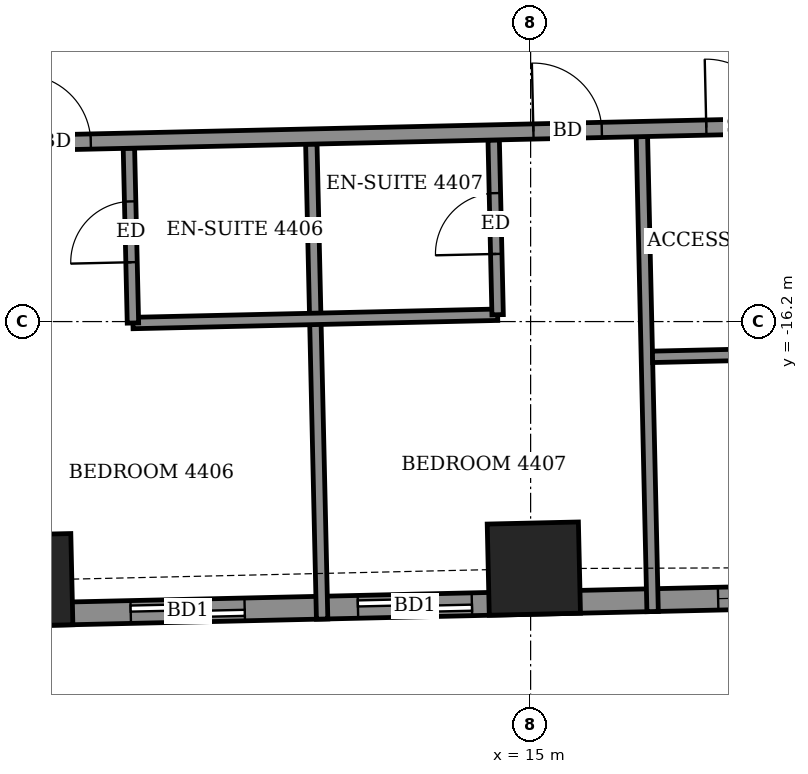
"""IFC4 building model, lengths in metres.
Left out: names, types, materials, properties, quantities, classifications, styles, units other than length and angle.
Written with IfcOpenShell. Run it as: python <this file> out.ifc"""

import sys

from ifc_helpers import new_model, si_unit, direction, frame, frame_2d, origin, origin_2d, place, context, subcontext, project, spatial, rectangle, extrude, element, fill, save


model = new_model("IFC4")
c1 = context("Model", 3, precision=1e-05, world=origin(), true_north=direction((0.0, 1.0)))
c2 = subcontext(c1, "Body", "Model", "MODEL_VIEW")
j1 = project(units=[si_unit("LENGTHUNIT", "METRE"), si_unit("PLANEANGLEUNIT", "RADIAN")], contexts=[c1])
p1 = place(None, origin())
s1 = spatial("IfcSite", under=j1, at=p1, CompositionType="ELEMENT")
p2 = place(p1, origin())
s2 = spatial("IfcBuilding", under=s1, at=p2, CompositionType="ELEMENT")
p3 = place(p2, frame((0.0, 0.0, 175.3)))
s3 = spatial("IfcBuildingStorey", under=s2, at=p3, CompositionType="ELEMENT", Elevation=175.3)
for number, where, z_axis, x_axis in (
    (1, (8.365, -19.602, -0.55), (0.0, 0.0, 1.0), (1.0, 0.023, 0.0)),
    (2, (15.042, -19.45, -0.55), (0.0, 0.0, 1.0), (1.0, 0.023, 0.0)),
):
    element("IfcColumn", number, at=place(p3, frame(where, z_axis=z_axis, x_axis=x_axis)), inside=s3, PredefinedType="COLUMN", context=c2, shape_type="SweptSolid", body=[
        extrude(rectangle(XDim=1.2, YDim=1.2, at=origin_2d()), origin(), (0.0, 0.0, 1.0), 3.6),
    ])
p4 = place(p3, frame((-18.189, -20.655, 0.0), z_axis=(0.0, 0.0, 1.0), x_axis=(0.999742285265, 0.022701609063, 0.0)))
e3 = element("IfcWall", 3, at=p4, inside=s3, PredefinedType="SOLIDWALL", context=c2, shape_type="SweptSolid", body=[
    extrude(rectangle(XDim=39.78, YDim=0.3, at=frame_2d((19.89, 0.0))), origin(), (0.0, 0.0, 1.0), 3.05),
])
p5 = place(p4, frame((1.973, 0.0, 0.0)))
e4 = element("IfcOpeningElement", 4, at=p5, cuts=e3, PredefinedType="OPENING", context=c2, shape_type="SweptSolid", body=[
    extrude(rectangle(XDim=1.5, YDim=2.4, at=frame_2d((0.75, 1.2))), frame((0.0, 0.16, 0.0), z_axis=(0.0, -1.0, 0.0), x_axis=(1.0, 0.0, 0.0)), (0.0, 0.0, 1.0), 0.32),
])
p6 = place(p4, frame((7.24, 0.0, 0.0)))
e5 = element("IfcOpeningElement", 5, at=p6, cuts=e3, PredefinedType="OPENING", context=c2, shape_type="SweptSolid", body=[
    extrude(rectangle(XDim=1.5, YDim=2.4, at=frame_2d((0.75, 1.2))), frame((0.0, 0.16, 0.0), z_axis=(0.0, -1.0, 0.0), x_axis=(1.0, 0.0, 0.0)), (0.0, 0.0, 1.0), 0.32),
])
p7 = place(p4, frame((10.23, 0.0, 0.0)))
e6 = element("IfcOpeningElement", 6, at=p7, cuts=e3, PredefinedType="OPENING", context=c2, shape_type="SweptSolid", body=[
    extrude(rectangle(XDim=1.5, YDim=2.4, at=frame_2d((0.75, 1.2))), frame((0.0, 0.16, 0.0), z_axis=(0.0, -1.0, 0.0), x_axis=(1.0, 0.0, 0.0)), (0.0, 0.0, 1.0), 0.32),
])
p8 = place(p4, frame((14.83, 0.0, 0.0)))
e7 = element("IfcOpeningElement", 7, at=p8, cuts=e3, PredefinedType="OPENING", context=c2, shape_type="SweptSolid", body=[
    extrude(rectangle(XDim=1.5, YDim=2.4, at=frame_2d((0.75, 1.2))), frame((0.0, 0.16, 0.0), z_axis=(0.0, -1.0, 0.0), x_axis=(1.0, 0.0, 0.0)), (0.0, 0.0, 1.0), 0.32),
])
p9 = place(p4, frame((17.97, 0.0, 0.0)))
e8 = element("IfcOpeningElement", 8, at=p9, cuts=e3, PredefinedType="OPENING", context=c2, shape_type="SweptSolid", body=[
    extrude(rectangle(XDim=1.2, YDim=2.4, at=frame_2d((0.6, 1.2))), frame((0.0, 0.16, 0.0), z_axis=(0.0, -1.0, 0.0), x_axis=(1.0, 0.0, 0.0)), (0.0, 0.0, 1.0), 0.32),
])
p10 = place(p4, frame((23.275, 0.0, 0.0)))
e9 = element("IfcOpeningElement", 9, at=p10, cuts=e3, PredefinedType="OPENING", context=c2, shape_type="SweptSolid", body=[
    extrude(rectangle(XDim=1.5, YDim=2.4, at=frame_2d((0.75, 1.2))), frame((0.0, 0.16, 0.0), z_axis=(0.0, -1.0, 0.0), x_axis=(1.0, 0.0, 0.0)), (0.0, 0.0, 1.0), 0.32),
])
p11 = place(p4, frame((27.935, 0.0, 0.0)))
e10 = element("IfcOpeningElement", 10, at=p11, cuts=e3, PredefinedType="OPENING", context=c2, shape_type="SweptSolid", body=[
    extrude(rectangle(XDim=1.5, YDim=2.4, at=frame_2d((0.75, 1.2))), frame((0.0, 0.16, 0.0), z_axis=(0.0, -1.0, 0.0), x_axis=(1.0, 0.0, 0.0)), (0.0, 0.0, 1.0), 0.32),
])
p12 = place(p4, frame((30.925, 0.0, 0.0)))
e11 = element("IfcOpeningElement", 11, at=p12, cuts=e3, PredefinedType="OPENING", context=c2, shape_type="SweptSolid", body=[
    extrude(rectangle(XDim=1.5, YDim=2.4, at=frame_2d((0.75, 1.2))), frame((0.0, 0.16, 0.0), z_axis=(0.0, -1.0, 0.0), x_axis=(1.0, 0.0, 0.0)), (0.0, 0.0, 1.0), 0.32),
])
p13 = place(p4, frame((35.665, 0.0, 0.9)))
e12 = element("IfcOpeningElement", 12, at=p13, cuts=e3, PredefinedType="OPENING", context=c2, shape_type="SweptSolid", body=[
    extrude(rectangle(XDim=2.4, YDim=1.5, at=frame_2d((1.2, 0.75))), frame((0.0, 0.16, 0.0), z_axis=(0.0, -1.0, 0.0), x_axis=(1.0, 0.0, 0.0)), (0.0, 0.0, 1.0), 0.32),
])
p14 = place(p3, frame((12.257, -20.114, 0.0), z_axis=(0.0, 0.0, 1.0), x_axis=(-0.022732052173, 0.999741593515, 0.0)))
e13 = element("IfcWall", 13, at=p14, inside=s3, PredefinedType="PARTITIONING", context=c2, shape_type="SweptSolid", body=[
    extrude(rectangle(XDim=6.251, YDim=0.15, at=frame_2d((3.125, 0.0))), origin(), (0.0, 0.0, 1.0), 2.55),
])
p15 = place(p3, frame((16.605, -20.015, 0.0), z_axis=(0.0, 0.0, 1.0), x_axis=(-0.022541260291, 0.999745913512, 0.0)))
e14 = element("IfcWall", 14, at=p15, inside=s3, PredefinedType="PARTITIONING", context=c2, shape_type="SweptSolid", body=[
    extrude(rectangle(XDim=6.25, YDim=0.15, at=frame_2d((3.125, 0.0))), origin(), (0.0, 0.0, 1.0), 2.55),
])
p16 = place(p3, frame((16.604, -16.664, 0.0), z_axis=(0.0, 0.0, 1.0), x_axis=(0.999744126128, 0.022620395041, 0.0)))
e15 = element("IfcWall", 15, at=p16, inside=s3, PredefinedType="PARTITIONING", context=c2, shape_type="SweptSolid", body=[
    extrude(rectangle(XDim=2.526, YDim=0.15, at=frame_2d((1.263, 0.0))), origin(), (0.0, 0.0, 1.0), 3.05),
])
p17 = place(p3, frame((9.768, -16.219, 0.0), z_axis=(0.0, 0.0, 1.0), x_axis=(0.999742570398, 0.022689048768, 0.0)))
e16 = element("IfcWall", 16, at=p17, inside=s3, PredefinedType="PARTITIONING", context=c2, shape_type="SweptSolid", body=[
    extrude(rectangle(XDim=4.799, YDim=0.15, at=frame_2d((2.399, 0.0))), origin(), (0.0, 0.0, 1.0), 3.05),
])
p18 = place(p3, frame((9.768, -16.219, 0.0), z_axis=(0.0, 0.0, 1.0), x_axis=(-0.023037316498, 0.999734605807, 0.0)))
e17 = element("IfcWall", 17, at=p18, inside=s3, PredefinedType="PARTITIONING", context=c2, shape_type="SweptSolid", body=[
    extrude(rectangle(XDim=2.3, YDim=0.15, at=frame_2d((1.15, 0.0))), origin(), (0.0, 0.0, 1.0), 3.05),
])
p19 = place(p18, frame((0.8, 0.0, 0.0)))
e18 = element("IfcOpeningElement", 18, at=p19, cuts=e17, PredefinedType="OPENING", context=c2, shape_type="SweptSolid", body=[
    extrude(rectangle(XDim=0.8, YDim=2.1, at=frame_2d((0.4, 1.05))), frame((0.0, 0.085, 0.0), z_axis=(0.0, -1.0, 0.0), x_axis=(1.0, 0.0, 0.0)), (0.0, 0.0, 1.0), 0.17),
])
p20 = place(p3, frame((14.566, -16.11, 0.0), z_axis=(0.0, 0.0, 1.0), x_axis=(-0.022612884682, 0.999744296031, 0.0)))
e19 = element("IfcWall", 19, at=p20, inside=s3, PredefinedType="PARTITIONING", context=c2, shape_type="SweptSolid", body=[
    extrude(rectangle(XDim=2.3, YDim=0.15, at=frame_2d((1.15, 0.0))), origin(), (0.0, 0.0, 1.0), 3.05),
])
p21 = place(p20, frame((0.8, 0.0, 0.0)))
e20 = element("IfcOpeningElement", 20, at=p21, cuts=e19, PredefinedType="OPENING", context=c2, shape_type="SweptSolid", body=[
    extrude(rectangle(XDim=0.8, YDim=2.1, at=frame_2d((0.4, 1.05))), frame((0.0, 0.085, 0.0), z_axis=(0.0, -1.0, 0.0), x_axis=(1.0, 0.0, 0.0)), (0.0, 0.0, 1.0), 0.17),
])
p22 = place(p3, frame((-21.279, -14.523, 0.0), z_axis=(0.0, 0.0, 1.0), x_axis=(0.999742878501, 0.022675468818, 0.0)))
e21 = element("IfcWall", 21, at=p22, inside=s3, PredefinedType="PARTITIONING", context=c2, shape_type="SweptSolid", body=[
    extrude(rectangle(XDim=46.48, YDim=0.2, at=frame_2d((23.24, 0.0))), origin(), (0.0, 0.0, 1.0), 3.05),
])
p23 = place(p22, frame((1.325, 0.0, 0.0)))
e22 = element("IfcOpeningElement", 22, at=p23, cuts=e21, PredefinedType="OPENING", context=c2, shape_type="SweptSolid", body=[
    extrude(rectangle(XDim=1.0, YDim=2.1, at=frame_2d((0.5, 1.05))), frame((0.0, 0.11, 0.0), z_axis=(0.0, -1.0, 0.0), x_axis=(1.0, 0.0, 0.0)), (0.0, 0.0, 1.0), 0.22),
])
p24 = place(p22, frame((5.9, 0.0, 0.0)))
e23 = element("IfcOpeningElement", 23, at=p24, cuts=e21, PredefinedType="OPENING", context=c2, shape_type="SweptSolid", body=[
    extrude(rectangle(XDim=0.9, YDim=2.1, at=frame_2d((0.45, 1.05))), frame((0.0, 0.11, 0.0), z_axis=(0.0, -1.0, 0.0), x_axis=(1.0, 0.0, 0.0)), (0.0, 0.0, 1.0), 0.22),
])
p25 = place(p22, frame((10.6, 0.0, 0.0)))
e24 = element("IfcOpeningElement", 24, at=p25, cuts=e21, PredefinedType="OPENING", context=c2, shape_type="SweptSolid", body=[
    extrude(rectangle(XDim=0.9, YDim=2.1, at=frame_2d((0.45, 1.05))), frame((0.0, 0.11, 0.0), z_axis=(0.0, -1.0, 0.0), x_axis=(1.0, 0.0, 0.0)), (0.0, 0.0, 1.0), 0.22),
])
p26 = place(p22, frame((12.525, 0.0, 0.0)))
e25 = element("IfcOpeningElement", 25, at=p26, cuts=e21, PredefinedType="OPENING", context=c2, shape_type="SweptSolid", body=[
    extrude(rectangle(XDim=0.9, YDim=2.1, at=frame_2d((0.45, 1.05))), frame((0.0, 0.11, 0.0), z_axis=(0.0, -1.0, 0.0), x_axis=(1.0, 0.0, 0.0)), (0.0, 0.0, 1.0), 0.22),
])
p27 = place(p22, frame((19.175, 0.0, 0.0)))
e26 = element("IfcOpeningElement", 26, at=p27, cuts=e21, PredefinedType="OPENING", context=c2, shape_type="SweptSolid", body=[
    extrude(rectangle(XDim=0.9, YDim=2.1, at=frame_2d((0.45, 1.05))), frame((0.0, 0.11, 0.0), z_axis=(0.0, -1.0, 0.0), x_axis=(1.0, 0.0, 0.0)), (0.0, 0.0, 1.0), 0.22),
])
p28 = place(p22, frame((21.05, 0.0, 0.0)))
e27 = element("IfcOpeningElement", 27, at=p28, cuts=e21, PredefinedType="OPENING", context=c2, shape_type="SweptSolid", body=[
    extrude(rectangle(XDim=0.9, YDim=2.1, at=frame_2d((0.45, 1.05))), frame((0.0, 0.11, 0.0), z_axis=(0.0, -1.0, 0.0), x_axis=(1.0, 0.0, 0.0)), (0.0, 0.0, 1.0), 0.22),
])
p29 = place(p22, frame((27.725, 0.0, 0.0)))
e28 = element("IfcOpeningElement", 28, at=p29, cuts=e21, PredefinedType="OPENING", context=c2, shape_type="SweptSolid", body=[
    extrude(rectangle(XDim=0.9, YDim=2.1, at=frame_2d((0.45, 1.05))), frame((0.0, 0.11, 0.0), z_axis=(0.0, -1.0, 0.0), x_axis=(1.0, 0.0, 0.0)), (0.0, 0.0, 1.0), 0.22),
])
p30 = place(p22, frame((29.6, 0.0, 0.0)))
e29 = element("IfcOpeningElement", 29, at=p30, cuts=e21, PredefinedType="OPENING", context=c2, shape_type="SweptSolid", body=[
    extrude(rectangle(XDim=0.9, YDim=2.1, at=frame_2d((0.45, 1.05))), frame((0.0, 0.11, 0.0), z_axis=(0.0, -1.0, 0.0), x_axis=(1.0, 0.0, 0.0)), (0.0, 0.0, 1.0), 0.22),
])
p31 = place(p22, frame((36.325, 0.0, 0.0)))
e30 = element("IfcOpeningElement", 30, at=p31, cuts=e21, PredefinedType="OPENING", context=c2, shape_type="SweptSolid", body=[
    extrude(rectangle(XDim=0.9, YDim=2.1, at=frame_2d((0.45, 1.05))), frame((0.0, 0.11, 0.0), z_axis=(0.0, -1.0, 0.0), x_axis=(1.0, 0.0, 0.0)), (0.0, 0.0, 1.0), 0.22),
])
p32 = place(p22, frame((43.915, 0.0, 0.0)))
e31 = element("IfcOpeningElement", 31, at=p32, cuts=e21, PredefinedType="OPENING", context=c2, shape_type="SweptSolid", body=[
    extrude(rectangle(XDim=1.0, YDim=2.1, at=frame_2d((0.5, 1.05))), frame((0.0, 0.11, 0.0), z_axis=(0.0, -1.0, 0.0), x_axis=(1.0, 0.0, 0.0)), (0.0, 0.0, 1.0), 0.22),
])
p33 = place(p22, frame((38.6, 0.0, 0.0)))
e32 = element("IfcOpeningElement", 32, at=p33, cuts=e21, PredefinedType="OPENING", context=c2, shape_type="SweptSolid", body=[
    extrude(rectangle(XDim=0.9, YDim=2.1, at=frame_2d((0.45, 1.05))), frame((0.0, 0.11, 0.0), z_axis=(0.0, -1.0, 0.0), x_axis=(1.0, 0.0, 0.0)), (0.0, 0.0, 1.0), 0.22),
])
p34 = place(p11, origin())
e33 = element("IfcDoor", 33, at=p34, inside=s3, OperationType="SLIDING_TO_LEFT", PredefinedType="DOOR", context=c2, shape_type="SweptSolid", body=[
    extrude(rectangle(XDim=1.5, YDim=2.4, at=frame_2d((0.75, 1.2))), frame((0.0, 0.025, 0.0), z_axis=(0.0, -1.0, 0.0), x_axis=(1.0, 0.0, 0.0)), (0.0, 0.0, 1.0), 0.05),
])
fill(e10, e33)
p35 = place(p12, origin())
e34 = element("IfcDoor", 34, at=p35, inside=s3, OperationType="SLIDING_TO_LEFT", PredefinedType="DOOR", context=c2, shape_type="SweptSolid", body=[
    extrude(rectangle(XDim=1.5, YDim=2.4, at=frame_2d((0.75, 1.2))), frame((0.0, 0.025, 0.0), z_axis=(0.0, -1.0, 0.0), x_axis=(1.0, 0.0, 0.0)), (0.0, 0.0, 1.0), 0.05),
])
fill(e11, e34)
p36 = place(p13, origin())
e35 = element("IfcWindow", 35, at=p36, inside=s3, PartitioningType="DOUBLE_PANEL_VERTICAL", PredefinedType="WINDOW", context=c2, shape_type="SweptSolid", body=[
    extrude(rectangle(XDim=2.4, YDim=1.5, at=frame_2d((1.2, 0.75))), frame((0.0, 0.03, 0.0), z_axis=(0.0, -1.0, 0.0), x_axis=(1.0, 0.0, 0.0)), (0.0, 0.0, 1.0), 0.06),
])
fill(e12, e35)
p37 = place(p30, origin())
e36 = element("IfcDoor", 36, at=p37, inside=s3, OperationType="SINGLE_SWING_RIGHT", PredefinedType="DOOR", context=c2, shape_type="SweptSolid", body=[
    extrude(rectangle(XDim=0.9, YDim=2.1, at=frame_2d((0.45, 1.05))), frame((0.0, 0.025, 0.0), z_axis=(0.0, -1.0, 0.0), x_axis=(1.0, 0.0, 0.0)), (0.0, 0.0, 1.0), 0.05),
])
fill(e29, e36)
p38 = place(p19, origin())
e37 = element("IfcDoor", 37, at=p38, inside=s3, OperationType="SINGLE_SWING_RIGHT", PredefinedType="DOOR", context=c2, shape_type="SweptSolid", body=[
    extrude(rectangle(XDim=0.8, YDim=2.1, at=frame_2d((0.4, 1.05))), frame((0.0, 0.025, 0.0), z_axis=(0.0, -1.0, 0.0), x_axis=(1.0, 0.0, 0.0)), (0.0, 0.0, 1.0), 0.05),
])
fill(e18, e37)
p39 = place(p31, origin())
e38 = element("IfcDoor", 38, at=p39, inside=s3, OperationType="SINGLE_SWING_LEFT", PredefinedType="DOOR", context=c2, shape_type="SweptSolid", body=[
    extrude(rectangle(XDim=0.9, YDim=2.1, at=frame_2d((0.45, 1.05))), frame((0.0, 0.025, 0.0), z_axis=(0.0, -1.0, 0.0), x_axis=(1.0, 0.0, 0.0)), (0.0, 0.0, 1.0), 0.05),
])
fill(e30, e38)
p40 = place(p21, origin())
e39 = element("IfcDoor", 39, at=p40, inside=s3, OperationType="SINGLE_SWING_LEFT", PredefinedType="DOOR", context=c2, shape_type="SweptSolid", body=[
    extrude(rectangle(XDim=0.8, YDim=2.1, at=frame_2d((0.4, 1.05))), frame((0.0, 0.025, 0.0), z_axis=(0.0, -1.0, 0.0), x_axis=(1.0, 0.0, 0.0)), (0.0, 0.0, 1.0), 0.05),
])
fill(e20, e39)
p41 = place(p33, origin())
e40 = element("IfcDoor", 40, at=p41, inside=s3, OperationType="SINGLE_SWING_RIGHT", PredefinedType="DOOR", context=c2, shape_type="SweptSolid", body=[
    extrude(rectangle(XDim=0.9, YDim=2.1, at=frame_2d((0.45, 1.05))), frame((0.0, 0.025, 0.0), z_axis=(0.0, -1.0, 0.0), x_axis=(1.0, 0.0, 0.0)), (0.0, 0.0, 1.0), 0.05),
])
fill(e32, e40)
save(model, sys.argv[1])
